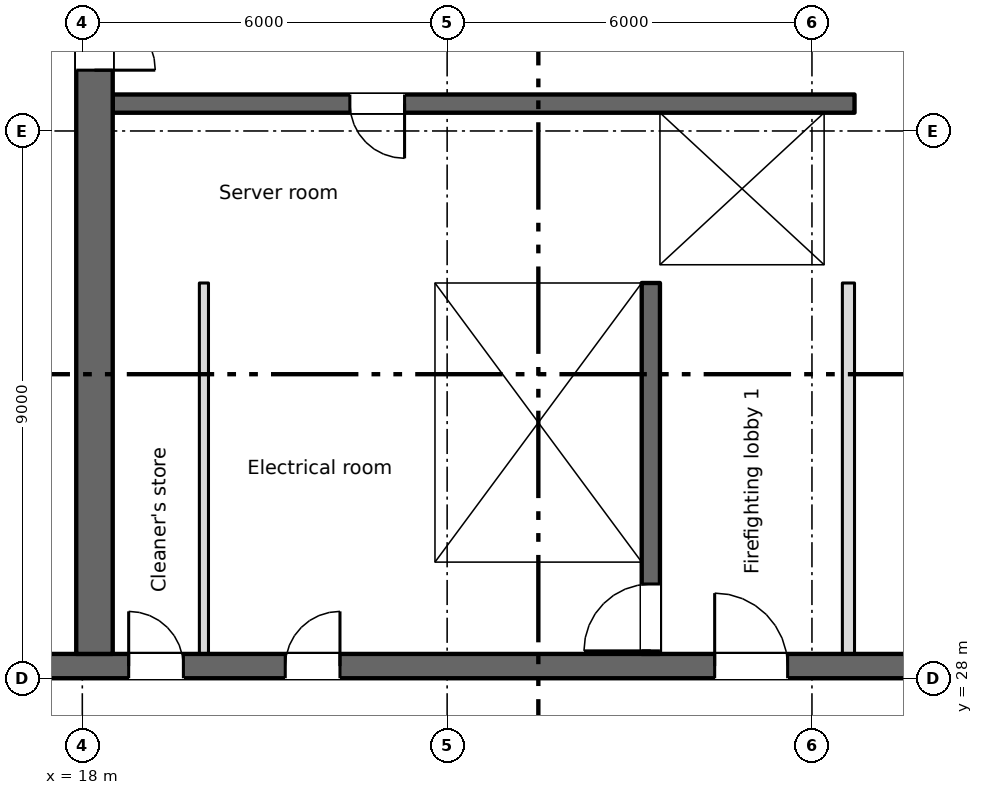
"""IFC4 building model, lengths in metres.
Left out: names, types, materials, properties, quantities, classifications, styles, units other than length and angle.
Written with IfcOpenShell. Run it as: python <this file> out.ifc"""

import sys

from ifc_helpers import new_model, si_unit, direction, frame, frame_2d, origin, place, context, subcontext, project, spatial, rectangle, extrude, element, fill, save


model = new_model("IFC4")
c1 = context("Model", 3, precision=1e-05, world=origin(), true_north=direction((0.0, 1.0)))
c2 = subcontext(c1, "Body", "Model", "MODEL_VIEW")
j1 = project(units=[si_unit("LENGTHUNIT", "METRE"), si_unit("PLANEANGLEUNIT", "RADIAN")], contexts=[c1])
p1 = place(None, origin())
s1 = spatial("IfcSite", under=j1, at=p1, CompositionType="ELEMENT")
p2 = place(p1, origin())
s2 = spatial("IfcBuilding", under=s1, at=p2, CompositionType="ELEMENT")
p3 = place(p2, frame((0.0, 0.0, 262.15)))
s3 = spatial("IfcBuildingStorey", under=s2, at=p3, CompositionType="ELEMENT", Elevation=262.15)
p4 = place(p3, frame((6.5, 28.2, 0.0), z_axis=(0.0, 0.0, 1.0), x_axis=(1.0, 0.0, 0.0)))
e1 = element("IfcWall", 1, at=p4, inside=s3, PredefinedType="SHEAR", context=c2, shape_type="SweptSolid", body=[
    extrude(rectangle(XDim=58.0, YDim=0.4, at=frame_2d((29.0, 0.0))), origin(), (0.0, 0.0, 1.0), 3.2),
])
p5 = place(p4, frame((12.262, 0.0, 0.0)))
e2 = element("IfcOpeningElement", 2, at=p5, cuts=e1, PredefinedType="OPENING", context=c2, shape_type="SweptSolid", body=[
    extrude(rectangle(XDim=0.9, YDim=2.1, at=frame_2d((0.45, 1.05))), frame((0.0, 0.21, 0.0), z_axis=(0.0, -1.0, 0.0), x_axis=(1.0, 0.0, 0.0)), (0.0, 0.0, 1.0), 0.42),
])
p6 = place(p4, frame((14.837, 0.0, 0.0)))
e3 = element("IfcOpeningElement", 3, at=p6, cuts=e1, PredefinedType="OPENING", context=c2, shape_type="SweptSolid", body=[
    extrude(rectangle(XDim=0.9, YDim=2.1, at=frame_2d((0.45, 1.05))), frame((0.0, 0.21, 0.0), z_axis=(0.0, -1.0, 0.0), x_axis=(1.0, 0.0, 0.0)), (0.0, 0.0, 1.0), 0.42),
])
p7 = place(p4, frame((49.262, 0.0, 0.0)))
e4 = element("IfcOpeningElement", 4, at=p7, cuts=e1, PredefinedType="OPENING", context=c2, shape_type="SweptSolid", body=[
    extrude(rectangle(XDim=0.9, YDim=2.1, at=frame_2d((0.45, 1.05))), frame((0.0, 0.21, 0.0), z_axis=(0.0, -1.0, 0.0), x_axis=(1.0, 0.0, 0.0)), (0.0, 0.0, 1.0), 0.42),
])
p8 = place(p4, frame((51.837, 0.0, 0.0)))
e5 = element("IfcOpeningElement", 5, at=p8, cuts=e1, PredefinedType="OPENING", context=c2, shape_type="SweptSolid", body=[
    extrude(rectangle(XDim=0.9, YDim=2.1, at=frame_2d((0.45, 1.05))), frame((0.0, 0.21, 0.0), z_axis=(0.0, -1.0, 0.0), x_axis=(1.0, 0.0, 0.0)), (0.0, 0.0, 1.0), 0.42),
])
p9 = place(p4, frame((1.55, 0.0, 0.0)))
e6 = element("IfcOpeningElement", 6, at=p9, cuts=e1, PredefinedType="OPENING", context=c2, shape_type="SweptSolid", body=[
    extrude(rectangle(XDim=0.9, YDim=2.1, at=frame_2d((0.45, 1.05))), frame((0.0, 0.21, 0.0), z_axis=(0.0, -1.0, 0.0), x_axis=(1.0, 0.0, 0.0)), (0.0, 0.0, 1.0), 0.42),
])
p10 = place(p4, frame((4.9, 0.0, 0.0)))
e7 = element("IfcOpeningElement", 7, at=p10, cuts=e1, PredefinedType="OPENING", context=c2, shape_type="SweptSolid", body=[
    extrude(rectangle(XDim=1.2, YDim=2.1, at=frame_2d((0.6, 1.05))), frame((0.0, 0.21, 0.0), z_axis=(0.0, -1.0, 0.0), x_axis=(1.0, 0.0, 0.0)), (0.0, 0.0, 1.0), 0.42),
])
p11 = place(p4, frame((31.9, 0.0, 0.0)))
e8 = element("IfcOpeningElement", 8, at=p11, cuts=e1, PredefinedType="OPENING", context=c2, shape_type="SweptSolid", body=[
    extrude(rectangle(XDim=1.2, YDim=2.1, at=frame_2d((0.6, 1.05))), frame((0.0, 0.21, 0.0), z_axis=(0.0, -1.0, 0.0), x_axis=(1.0, 0.0, 0.0)), (0.0, 0.0, 1.0), 0.42),
])
p12 = place(p4, frame((55.4, 0.0, 0.0)))
e9 = element("IfcOpeningElement", 9, at=p12, cuts=e1, PredefinedType="OPENING", context=c2, shape_type="SweptSolid", body=[
    extrude(rectangle(XDim=1.2, YDim=2.1, at=frame_2d((0.6, 1.05))), frame((0.0, 0.21, 0.0), z_axis=(0.0, -1.0, 0.0), x_axis=(1.0, 0.0, 0.0)), (0.0, 0.0, 1.0), 0.42),
])
p13 = place(p4, frame((21.9, 0.0, 0.0)))
e10 = element("IfcOpeningElement", 10, at=p13, cuts=e1, PredefinedType="OPENING", context=c2, shape_type="SweptSolid", body=[
    extrude(rectangle(XDim=1.2, YDim=2.1, at=frame_2d((0.6, 1.05))), frame((0.0, 0.21, 0.0), z_axis=(0.0, -1.0, 0.0), x_axis=(1.0, 0.0, 0.0)), (0.0, 0.0, 1.0), 0.42),
])
p14 = place(p4, frame((41.9, 0.0, 0.0)))
e11 = element("IfcOpeningElement", 11, at=p14, cuts=e1, PredefinedType="OPENING", context=c2, shape_type="SweptSolid", body=[
    extrude(rectangle(XDim=1.2, YDim=2.1, at=frame_2d((0.6, 1.05))), frame((0.0, 0.21, 0.0), z_axis=(0.0, -1.0, 0.0), x_axis=(1.0, 0.0, 0.0)), (0.0, 0.0, 1.0), 0.42),
])
p15 = place(p4, frame((25.05, 0.0, 0.0)))
e12 = element("IfcOpeningElement", 12, at=p15, cuts=e1, PredefinedType="OPENING", context=c2, shape_type="SweptSolid", body=[
    extrude(rectangle(XDim=2.4, YDim=2.1, at=frame_2d((1.2, 1.05))), frame((0.0, 0.21, 0.0), z_axis=(0.0, -1.0, 0.0), x_axis=(1.0, 0.0, 0.0)), (0.0, 0.0, 1.0), 0.42),
])
p16 = place(p4, frame((37.55, 0.0, 0.0)))
e13 = element("IfcOpeningElement", 13, at=p16, cuts=e1, PredefinedType="OPENING", context=c2, shape_type="SweptSolid", body=[
    extrude(rectangle(XDim=2.4, YDim=2.1, at=frame_2d((1.2, 1.05))), frame((0.0, 0.21, 0.0), z_axis=(0.0, -1.0, 0.0), x_axis=(1.0, 0.0, 0.0)), (0.0, 0.0, 1.0), 0.42),
])
p17 = place(p4, frame((8.25, 0.0, 0.0)))
e14 = element("IfcOpeningElement", 14, at=p17, cuts=e1, PredefinedType="OPENING", context=c2, shape_type="SweptSolid", body=[
    extrude(rectangle(XDim=2.4, YDim=2.1, at=frame_2d((1.2, 1.05))), frame((0.0, 0.21, 0.0), z_axis=(0.0, -1.0, 0.0), x_axis=(1.0, 0.0, 0.0)), (0.0, 0.0, 1.0), 0.42),
])
p18 = place(p4, frame((29.05, 0.0, 0.0)))
e15 = element("IfcOpeningElement", 15, at=p18, cuts=e1, PredefinedType="OPENING", context=c2, shape_type="SweptSolid", body=[
    extrude(rectangle(XDim=0.9, YDim=2.1, at=frame_2d((0.45, 1.05))), frame((0.0, 0.21, 0.0), z_axis=(0.0, -1.0, 0.0), x_axis=(1.0, 0.0, 0.0)), (0.0, 0.0, 1.0), 0.42),
])
p19 = place(p4, frame((35.05, 0.0, 0.0)))
e16 = element("IfcOpeningElement", 16, at=p19, cuts=e1, PredefinedType="OPENING", context=c2, shape_type="SweptSolid", body=[
    extrude(rectangle(XDim=0.9, YDim=2.1, at=frame_2d((0.45, 1.05))), frame((0.0, 0.21, 0.0), z_axis=(0.0, -1.0, 0.0), x_axis=(1.0, 0.0, 0.0)), (0.0, 0.0, 1.0), 0.42),
])
p20 = place(p3, frame((18.2, 28.4, 0.0), z_axis=(0.0, 0.0, 1.0), x_axis=(0.0, 1.0, 0.0)))
e17 = element("IfcWall", 17, at=p20, inside=s3, PredefinedType="SHEAR", context=c2, shape_type="SweptSolid", body=[
    extrude(rectangle(XDim=17.0, YDim=0.6, at=frame_2d((8.5, 0.0))), origin(), (0.0, 0.0, 1.0), 3.2),
])
p21 = place(p20, frame((9.6, 0.0, 0.0)))
e18 = element("IfcOpeningElement", 18, at=p21, cuts=e17, PredefinedType="OPENING", context=c2, shape_type="SweptSolid", body=[
    extrude(rectangle(XDim=2.0, YDim=2.1, at=frame_2d((1.0, 1.05))), frame((0.0, 0.31, 0.0), z_axis=(0.0, -1.0, 0.0), x_axis=(1.0, 0.0, 0.0)), (0.0, 0.0, 1.0), 0.62),
])
p22 = place(p20, frame((15.45, 0.0, 0.0)))
e19 = element("IfcOpeningElement", 19, at=p22, cuts=e17, PredefinedType="OPENING", context=c2, shape_type="SweptSolid", body=[
    extrude(rectangle(XDim=1.2, YDim=2.1, at=frame_2d((0.6, 1.05))), frame((0.0, 0.31, 0.0), z_axis=(0.0, -1.0, 0.0), x_axis=(1.0, 0.0, 0.0)), (0.0, 0.0, 1.0), 0.62),
])
p23 = place(p3, frame((23.65, 28.4, 0.0), z_axis=(0.0, 0.0, 1.0), x_axis=(0.0, 1.0, 0.0)))
e20 = element("IfcWall", 20, at=p23, inside=s3, PredefinedType="SHEAR", context=c2, shape_type="SweptSolid", body=[
    extrude(rectangle(XDim=6.1, YDim=0.3, at=frame_2d((3.05, 0.0))), origin(), (0.0, 0.0, 1.0), 3.2),
])
p24 = place(p3, frame((27.35, 28.4, 0.0), z_axis=(0.0, 0.0, 1.0), x_axis=(0.0, 1.0, 0.0)))
e21 = element("IfcWall", 21, at=p24, inside=s3, PredefinedType="SHEAR", context=c2, shape_type="SweptSolid", body=[
    extrude(rectangle(XDim=6.1, YDim=0.3, at=frame_2d((3.05, 0.0))), origin(), (0.0, 0.0, 1.0), 3.2),
])
p25 = place(p24, frame((0.05, 0.0, 0.0)))
e22 = element("IfcOpeningElement", 22, at=p25, cuts=e21, PredefinedType="OPENING", context=c2, shape_type="SweptSolid", body=[
    extrude(rectangle(XDim=1.1, YDim=2.1, at=frame_2d((0.55, 1.05))), frame((0.0, 0.16, 0.0), z_axis=(0.0, -1.0, 0.0), x_axis=(1.0, 0.0, 0.0)), (0.0, 0.0, 1.0), 0.32),
])
p26 = place(p3, frame((18.5, 34.65, 0.0), z_axis=(0.0, 0.0, 1.0), x_axis=(1.0, 0.0, 0.0)))
e23 = element("IfcWall", 23, at=p26, inside=s3, PredefinedType="SHEAR", context=c2, shape_type="SweptSolid", body=[
    extrude(rectangle(XDim=12.2, YDim=0.3, at=frame_2d((6.1, 0.0))), origin(), (0.0, 0.0, 1.0), 3.2),
])
p27 = place(p26, frame((9.8, 0.0, 0.0)))
e24 = element("IfcOpeningElement", 24, at=p27, cuts=e23, PredefinedType="OPENING", context=c2, shape_type="SweptSolid", body=[
    extrude(rectangle(XDim=1.1, YDim=2.1, at=frame_2d((0.55, 1.05))), frame((0.0, 0.16, 0.0), z_axis=(0.0, -1.0, 0.0), x_axis=(1.0, 0.0, 0.0)), (0.0, 0.0, 1.0), 0.32),
])
p28 = place(p3, frame((30.7, 37.45, 0.0), z_axis=(0.0, 0.0, 1.0), x_axis=(-1.0, 0.0, 0.0)))
e25 = element("IfcWall", 25, at=p28, inside=s3, PredefinedType="SHEAR", context=c2, shape_type="SweptSolid", body=[
    extrude(rectangle(XDim=12.2, YDim=0.3, at=frame_2d((6.1, 0.0))), origin(), (0.0, 0.0, 1.0), 3.2),
])
p29 = place(p28, frame((7.4, 0.0, 0.0)))
e26 = element("IfcOpeningElement", 26, at=p29, cuts=e25, PredefinedType="OPENING", context=c2, shape_type="SweptSolid", body=[
    extrude(rectangle(XDim=0.9, YDim=2.1, at=frame_2d((0.45, 1.05))), frame((0.0, 0.16, 0.0), z_axis=(0.0, -1.0, 0.0), x_axis=(1.0, 0.0, 0.0)), (0.0, 0.0, 1.0), 0.32),
])
p30 = place(p3, frame((27.35, 34.8, 0.0), z_axis=(0.0, 0.0, 1.0), x_axis=(0.0, 1.0, 0.0)))
e27 = element("IfcWall", 27, at=p30, inside=s3, PredefinedType="SHEAR", context=c2, shape_type="SweptSolid", body=[
    extrude(rectangle(XDim=2.5, YDim=0.3, at=frame_2d((1.25, 0.0))), origin(), (0.0, 0.0, 1.0), 3.2),
])
p31 = place(p3, frame((30.45, 34.8, 0.0), z_axis=(0.0, 0.0, 1.0), x_axis=(0.0, 1.0, 0.0)))
e28 = element("IfcWall", 28, at=p31, inside=s3, PredefinedType="SHEAR", context=c2, shape_type="SweptSolid", body=[
    extrude(rectangle(XDim=2.5, YDim=0.5, at=frame_2d((1.25, 0.0))), origin(), (0.0, 0.0, 1.0), 3.2),
])
p32 = place(p3, frame((30.6, 28.4, 0.0), z_axis=(0.0, 0.0, 1.0), x_axis=(0.0, 1.0, 0.0)))
e29 = element("IfcWall", 29, at=p32, inside=s3, PredefinedType="PARTITIONING", context=c2, shape_type="SweptSolid", body=[
    extrude(rectangle(XDim=6.1, YDim=0.2, at=frame_2d((3.05, 0.0))), origin(), (0.0, 0.0, 1.0), 3.2),
])
p33 = place(p3, frame((20.0, 28.4, 0.0), z_axis=(0.0, 0.0, 1.0), x_axis=(0.0, 1.0, 0.0)))
e30 = element("IfcWall", 30, at=p33, inside=s3, PredefinedType="PARTITIONING", context=c2, shape_type="SweptSolid", body=[
    extrude(rectangle(XDim=6.1, YDim=0.15, at=frame_2d((3.05, 0.0))), origin(), (0.0, 0.0, 1.0), 3.2),
])
p34 = place(p5, origin())
e31 = element("IfcDoor", 31, at=p34, inside=s3, OperationType="SINGLE_SWING_LEFT", PredefinedType="DOOR", context=c2, shape_type="SweptSolid", body=[
    extrude(rectangle(XDim=0.9, YDim=2.1, at=frame_2d((0.45, 1.05))), frame((0.0, 0.025, 0.0), z_axis=(0.0, -1.0, 0.0), x_axis=(1.0, 0.0, 0.0)), (0.0, 0.0, 1.0), 0.05),
])
fill(e2, e31)
p35 = place(p6, origin())
e32 = element("IfcDoor", 32, at=p35, inside=s3, OperationType="SINGLE_SWING_RIGHT", PredefinedType="DOOR", context=c2, shape_type="SweptSolid", body=[
    extrude(rectangle(XDim=0.9, YDim=2.1, at=frame_2d((0.45, 1.05))), frame((0.0, 0.025, 0.0), z_axis=(0.0, -1.0, 0.0), x_axis=(1.0, 0.0, 0.0)), (0.0, 0.0, 1.0), 0.05),
])
fill(e3, e32)
p36 = place(p29, origin())
e33 = element("IfcDoor", 33, at=p36, inside=s3, OperationType="SINGLE_SWING_LEFT", PredefinedType="DOOR", context=c2, shape_type="SweptSolid", body=[
    extrude(rectangle(XDim=0.9, YDim=2.1, at=frame_2d((0.45, 1.05))), frame((0.0, 0.025, 0.0), z_axis=(0.0, -1.0, 0.0), x_axis=(1.0, 0.0, 0.0)), (0.0, 0.0, 1.0), 0.05),
])
fill(e26, e33)
p37 = place(p27, origin())
e34 = element("IfcDoor", 34, at=p37, inside=s3, OperationType="SLIDING_TO_LEFT", PredefinedType="DOOR", context=c2, shape_type="SweptSolid", body=[
    extrude(rectangle(XDim=1.1, YDim=2.1, at=frame_2d((0.55, 1.05))), frame((0.0, 0.025, 0.0), z_axis=(0.0, -1.0, 0.0), x_axis=(1.0, 0.0, 0.0)), (0.0, 0.0, 1.0), 0.05),
])
fill(e24, e34)
p38 = place(p25, origin())
e35 = element("IfcDoor", 35, at=p38, inside=s3, OperationType="SINGLE_SWING_LEFT", PredefinedType="DOOR", context=c2, shape_type="SweptSolid", body=[
    extrude(rectangle(XDim=1.1, YDim=2.1, at=frame_2d((0.55, 1.05))), frame((0.0, 0.025, 0.0), z_axis=(0.0, -1.0, 0.0), x_axis=(1.0, 0.0, 0.0)), (0.0, 0.0, 1.0), 0.05),
])
fill(e22, e35)
p39 = place(p13, origin())
e36 = element("IfcDoor", 36, at=p39, inside=s3, OperationType="SINGLE_SWING_LEFT", PredefinedType="DOOR", context=c2, shape_type="SweptSolid", body=[
    extrude(rectangle(XDim=1.2, YDim=2.1, at=frame_2d((0.6, 1.05))), frame((0.0, 0.025, 0.0), z_axis=(0.0, -1.0, 0.0), x_axis=(1.0, 0.0, 0.0)), (0.0, 0.0, 1.0), 0.05),
])
fill(e10, e36)
p40 = place(p21, origin())
e37 = element("IfcDoor", 37, at=p40, inside=s3, OperationType="DOUBLE_DOOR_SINGLE_SWING", PredefinedType="DOOR", context=c2, shape_type="SweptSolid", body=[
    extrude(rectangle(XDim=2.0, YDim=2.1, at=frame_2d((1.0, 1.05))), frame((0.0, 0.025, 0.0), z_axis=(0.0, -1.0, 0.0), x_axis=(1.0, 0.0, 0.0)), (0.0, 0.0, 1.0), 0.05),
])
fill(e18, e37)
save(model, sys.argv[1])
